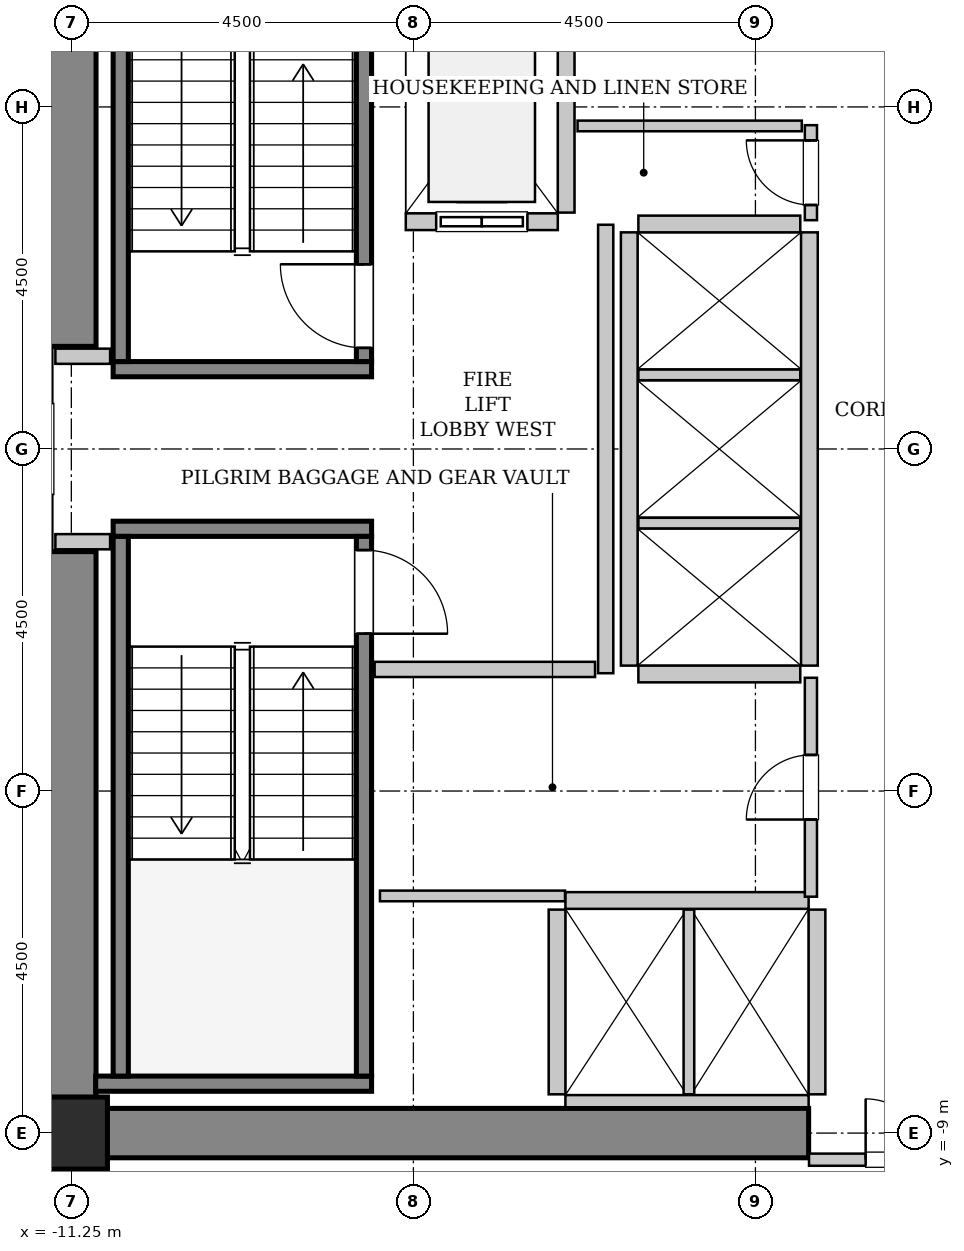
"""IFC4 building model, lengths in metres.
Left out: names, types, materials, properties, quantities, classifications, styles, units other than length and angle.
Written with IfcOpenShell. Run it as: python <this file> out.ifc"""

import sys

from ifc_helpers import new_model, si_unit, direction, frame, frame_2d, origin, origin_2d, place, context, subcontext, project, spatial, rectangle, hollow_rectangle, extrude, source, transform, mapped, element, fill, save


model = new_model("IFC4")
c1 = context("Model", 3, precision=1e-05, world=origin(), true_north=direction((0.0, 1.0)))
c2 = subcontext(c1, "Body", "Model", "MODEL_VIEW")
j1 = project(units=[si_unit("LENGTHUNIT", "METRE"), si_unit("PLANEANGLEUNIT", "RADIAN")], contexts=[c1])
p1 = place(None, origin())
s1 = spatial("IfcSite", under=j1, at=p1, CompositionType="ELEMENT")
p2 = place(p1, origin())
s2 = spatial("IfcBuilding", under=s1, at=p2, CompositionType="ELEMENT")
p3 = place(p2, frame((0.0, 0.0, 78.6)))
s3 = spatial("IfcBuildingStorey", under=s2, at=p3, CompositionType="ELEMENT", Elevation=78.6)
m1 = source(origin(), c2, "Body", "SweptSolid", [
    extrude(rectangle(XDim=10.025, YDim=0.65, at=frame_2d((5.012, 0.0))), origin(), (0.0, 0.0, 1.0), 3.8),
])
p4 = place(p3, frame((-11.575, -9.0, 0.0), z_axis=(0.0, 0.0, 1.0), x_axis=(1.0, 0.0, 0.0)))
e1 = element("IfcWall", 1, at=p4, inside=s3, PredefinedType="SHEAR", context=c2, shape_type="MappedRepresentation", body=[
    mapped(m1, transform((0.0, 0.0, 0.0), x_axis=(1.0, 0.0, 0.0), y_axis=(0.0, 1.0, 0.0), z_axis=(0.0, 0.0, 1.0), scale=1.0)),
])
m2 = source(origin(), c2, "Body", "SweptSolid", [
    extrude(rectangle(XDim=7.325, YDim=0.65, at=frame_2d((3.663, 0.0))), origin(), (0.0, 0.0, 1.0), 3.8),
])
for number, where, z_axis, x_axis in (
    (2, (-11.25, -8.675, 0.0), (0.0, 0.0, 1.0), (0.0, 1.0, 0.0)),
    (3, (-11.25, 1.35, 0.0), (0.0, 0.0, 1.0), (0.0, 1.0, 0.0)),
):
    element("IfcWall", number, at=place(p3, frame(where, z_axis=z_axis, x_axis=x_axis)), inside=s3, PredefinedType="SHEAR", context=c2, shape_type="MappedRepresentation", body=[
        mapped(m2, transform((0.0, 0.0, 0.0), x_axis=(1.0, 0.0, 0.0), y_axis=(0.0, 1.0, 0.0), z_axis=(0.0, 0.0, 1.0), scale=1.0)),
    ])
m3 = source(origin(), c2, "Body", "SweptSolid", [
    extrude(hollow_rectangle(XDim=0.95, YDim=0.95, WallThickness=0.045, InnerFilletRadius=0.045, OuterFilletRadius=0.09, at=origin_2d()), origin(), (0.0, 0.0, 1.0), 3.8),
])
p5 = place(p3, frame((-11.25, -9.0, 0.0), z_axis=(0.0, 0.0, 1.0), x_axis=(1.0, 0.0, 0.0)))
e4 = element("IfcColumn", 4, at=p5, inside=s3, PredefinedType="COLUMN", context=c2, shape_type="MappedRepresentation", body=[
    mapped(m3, transform((0.0, 0.0, 0.0), x_axis=(1.0, 0.0, 0.0), y_axis=(0.0, 1.0, 0.0), z_axis=(0.0, 0.0, 1.0), scale=1.0)),
])
m4 = source(origin(), c2, "Body", "SweptSolid", [
    extrude(rectangle(XDim=3.4, YDim=0.2, at=frame_2d((1.7, 0.0))), origin(), (0.0, 0.0, 1.0), 3.8),
])
p6 = place(p3, frame((-7.3, 1.05, 0.0), z_axis=(0.0, 0.0, 1.0), x_axis=(-1.0, 0.0, 0.0)))
e5 = element("IfcWall", 5, at=p6, inside=s3, PredefinedType="SOLIDWALL", context=c2, shape_type="MappedRepresentation", body=[
    mapped(m4, transform((0.0, 0.0, 0.0), x_axis=(1.0, 0.0, 0.0), y_axis=(0.0, 1.0, 0.0), z_axis=(0.0, 0.0, 1.0), scale=1.0)),
])
m5 = source(origin(), c2, "Body", "SweptSolid", [
    extrude(rectangle(XDim=7.1, YDim=0.2, at=frame_2d((3.55, 0.0))), origin(), (0.0, 0.0, 1.0), 3.8),
])
p7 = place(p3, frame((-7.4, 1.15, 0.0), z_axis=(0.0, 0.0, 1.0), x_axis=(0.0, 1.0, 0.0)))
e6 = element("IfcWall", 6, at=p7, inside=s3, PredefinedType="SOLIDWALL", context=c2, shape_type="MappedRepresentation", body=[
    mapped(m5, transform((0.0, 0.0, 0.0), x_axis=(1.0, 0.0, 0.0), y_axis=(0.0, 1.0, 0.0), z_axis=(0.0, 0.0, 1.0), scale=1.0)),
])
p8 = place(p7, frame((0.18, 0.0, 0.0)))
e7 = element("IfcOpeningElement", 7, at=p8, cuts=e6, PredefinedType="OPENING", context=c2, shape_type="SweptSolid", body=[
    extrude(rectangle(XDim=1.1, YDim=2.15, at=frame_2d((0.55, 1.075))), frame((0.0, 0.11, 0.0), z_axis=(0.0, -1.0, 0.0), x_axis=(1.0, 0.0, 0.0)), (0.0, 0.0, 1.0), 0.22),
])
p9 = place(p3, frame((-10.6, 1.15, 0.0), z_axis=(0.0, 0.0, 1.0), x_axis=(0.0, 1.0, 0.0)))
e8 = element("IfcWall", 8, at=p9, inside=s3, PredefinedType="SOLIDWALL", context=c2, shape_type="MappedRepresentation", body=[
    mapped(m5, transform((0.0, 0.0, 0.0), x_axis=(1.0, 0.0, 0.0), y_axis=(0.0, 1.0, 0.0), z_axis=(0.0, 0.0, 1.0), scale=1.0)),
])
p10 = place(p3, frame((-10.7, -1.05, 0.0), z_axis=(0.0, 0.0, 1.0), x_axis=(1.0, 0.0, 0.0)))
e9 = element("IfcWall", 9, at=p10, inside=s3, PredefinedType="SOLIDWALL", context=c2, shape_type="MappedRepresentation", body=[
    mapped(m4, transform((0.0, 0.0, 0.0), x_axis=(1.0, 0.0, 0.0), y_axis=(0.0, 1.0, 0.0), z_axis=(0.0, 0.0, 1.0), scale=1.0)),
])
m6 = source(origin(), c2, "Body", "SweptSolid", [
    extrude(rectangle(XDim=3.63, YDim=0.2, at=frame_2d((1.815, 0.0))), origin(), (0.0, 0.0, 1.0), 3.8),
])
p11 = place(p3, frame((-10.93, -8.35, 0.0), z_axis=(0.0, 0.0, 1.0), x_axis=(1.0, 0.0, 0.0)))
e10 = element("IfcWall", 10, at=p11, inside=s3, PredefinedType="SOLIDWALL", context=c2, shape_type="MappedRepresentation", body=[
    mapped(m6, transform((0.0, 0.0, 0.0), x_axis=(1.0, 0.0, 0.0), y_axis=(0.0, 1.0, 0.0), z_axis=(0.0, 0.0, 1.0), scale=1.0)),
])
p12 = place(p3, frame((-10.6, -1.15, 0.0), z_axis=(0.0, 0.0, 1.0), x_axis=(0.0, -1.0, 0.0)))
e11 = element("IfcWall", 11, at=p12, inside=s3, PredefinedType="SOLIDWALL", context=c2, shape_type="MappedRepresentation", body=[
    mapped(m5, transform((0.0, 0.0, 0.0), x_axis=(1.0, 0.0, 0.0), y_axis=(0.0, 1.0, 0.0), z_axis=(0.0, 0.0, 1.0), scale=1.0)),
])
p13 = place(p3, frame((-7.4, -1.15, 0.0), z_axis=(0.0, 0.0, 1.0), x_axis=(0.0, -1.0, 0.0)))
e12 = element("IfcWall", 12, at=p13, inside=s3, PredefinedType="SOLIDWALL", context=c2, shape_type="MappedRepresentation", body=[
    mapped(m5, transform((0.0, 0.0, 0.0), x_axis=(1.0, 0.0, 0.0), y_axis=(0.0, 1.0, 0.0), z_axis=(0.0, 0.0, 1.0), scale=1.0)),
])
p14 = place(p13, frame((0.18, 0.0, 0.0)))
e13 = element("IfcOpeningElement", 13, at=p14, cuts=e12, PredefinedType="OPENING", context=c2, shape_type="SweptSolid", body=[
    extrude(rectangle(XDim=1.1, YDim=2.15, at=frame_2d((0.55, 1.075))), frame((0.0, 0.11, 0.0), z_axis=(0.0, -1.0, 0.0), x_axis=(1.0, 0.0, 0.0)), (0.0, 0.0, 1.0), 0.22),
])
m7 = source(origin(), c2, "Body", "SweptSolid", [
    extrude(rectangle(XDim=2.0, YDim=0.22, at=frame_2d((1.0, 0.0))), origin(), (0.0, 0.0, 1.0), 3.535),
])
p15 = place(p3, frame((-6.85, 2.99, 0.0), z_axis=(0.0, 0.0, 1.0), x_axis=(1.0, 0.0, 0.0)))
e14 = element("IfcWall", 14, at=p15, inside=s3, PredefinedType="SOLIDWALL", context=c2, shape_type="MappedRepresentation", body=[
    mapped(m7, transform((0.0, 0.0, 0.0), x_axis=(1.0, 0.0, 0.0), y_axis=(0.0, 1.0, 0.0), z_axis=(0.0, 0.0, 1.0), scale=1.0)),
])
p16 = place(p15, frame((0.4, 0.0, 0.0)))
e15 = element("IfcOpeningElement", 15, at=p16, cuts=e14, PredefinedType="OPENING", context=c2, shape_type="SweptSolid", body=[
    extrude(rectangle(XDim=1.2, YDim=2.2, at=frame_2d((0.6, 1.1))), frame((0.0, 0.12, 0.0), z_axis=(0.0, -1.0, 0.0), x_axis=(1.0, 0.0, 0.0)), (0.0, 0.0, 1.0), 0.24),
])
m8 = source(origin(), c2, "Body", "SweptSolid", [
    extrude(rectangle(XDim=2.68, YDim=0.22, at=frame_2d((1.34, 0.0))), origin(), (0.0, 0.0, 1.0), 3.535),
])
p17 = place(p3, frame((-4.74, 3.11, 0.0), z_axis=(0.0, 0.0, 1.0), x_axis=(0.0, 1.0, 0.0)))
e16 = element("IfcWall", 16, at=p17, inside=s3, PredefinedType="SOLIDWALL", context=c2, shape_type="MappedRepresentation", body=[
    mapped(m8, transform((0.0, 0.0, 0.0), x_axis=(1.0, 0.0, 0.0), y_axis=(0.0, 1.0, 0.0), z_axis=(0.0, 0.0, 1.0), scale=1.0)),
])
m9 = source(origin(), c2, "Body", "SweptSolid", [
    extrude(rectangle(XDim=3.2, YDim=0.22, at=frame_2d((1.6, 0.0))), origin(), (0.0, 0.0, 1.0), 3.535),
])
p18 = place(p3, frame((-1.55, -5.94, 0.0), z_axis=(0.0, 0.0, 1.0), x_axis=(-1.0, 0.0, 0.0)))
e17 = element("IfcWall", 17, at=p18, inside=s3, PredefinedType="SOLIDWALL", context=c2, shape_type="MappedRepresentation", body=[
    mapped(m9, transform((0.0, 0.0, 0.0), x_axis=(1.0, 0.0, 0.0), y_axis=(0.0, 1.0, 0.0), z_axis=(0.0, 0.0, 1.0), scale=1.0)),
])
m10 = source(origin(), c2, "Body", "SweptSolid", [
    extrude(rectangle(XDim=3.2, YDim=0.16, at=frame_2d((1.6, 0.0))), origin(), (0.0, 0.0, 1.0), 2.425),
])
p19 = place(p3, frame((-4.75, -8.58, 0.0), z_axis=(0.0, 0.0, 1.0), x_axis=(1.0, 0.0, 0.0)))
e18 = element("IfcWall", 18, at=p19, inside=s3, PredefinedType="PARTITIONING", context=c2, shape_type="MappedRepresentation", body=[
    mapped(m10, transform((0.0, 0.0, 0.0), x_axis=(1.0, 0.0, 0.0), y_axis=(0.0, 1.0, 0.0), z_axis=(0.0, 0.0, 1.0), scale=1.0)),
])
m11 = source(origin(), c2, "Body", "SweptSolid", [
    extrude(rectangle(XDim=2.43, YDim=0.22, at=frame_2d((1.215, 0.0))), origin(), (0.0, 0.0, 1.0), 3.535),
])
p20 = place(p3, frame((-4.86, -6.06, 0.0), z_axis=(0.0, 0.0, 1.0), x_axis=(0.0, -1.0, 0.0)))
e19 = element("IfcWall", 19, at=p20, inside=s3, PredefinedType="SOLIDWALL", context=c2, shape_type="MappedRepresentation", body=[
    mapped(m11, transform((0.0, 0.0, 0.0), x_axis=(1.0, 0.0, 0.0), y_axis=(0.0, 1.0, 0.0), z_axis=(0.0, 0.0, 1.0), scale=1.0)),
])
m12 = source(origin(), c2, "Body", "SweptSolid", [
    extrude(rectangle(XDim=2.43, YDim=0.14, at=frame_2d((1.215, 0.0))), origin(), (0.0, 0.0, 1.0), 3.535),
])
p21 = place(p3, frame((-3.125, -8.49, 0.0), z_axis=(0.0, 0.0, 1.0), x_axis=(0.0, 1.0, 0.0)))
e20 = element("IfcWall", 20, at=p21, inside=s3, PredefinedType="PARTITIONING", context=c2, shape_type="MappedRepresentation", body=[
    mapped(m12, transform((0.0, 0.0, 0.0), x_axis=(1.0, 0.0, 0.0), y_axis=(0.0, 1.0, 0.0), z_axis=(0.0, 0.0, 1.0), scale=1.0)),
])
p22 = place(p3, frame((-1.44, -8.49, 0.0), z_axis=(0.0, 0.0, 1.0), x_axis=(0.0, 1.0, 0.0)))
e21 = element("IfcWall", 21, at=p22, inside=s3, PredefinedType="SOLIDWALL", context=c2, shape_type="MappedRepresentation", body=[
    mapped(m11, transform((0.0, 0.0, 0.0), x_axis=(1.0, 0.0, 0.0), y_axis=(0.0, 1.0, 0.0), z_axis=(0.0, 0.0, 1.0), scale=1.0)),
])
m13 = source(origin(), c2, "Body", "SweptSolid", [
    extrude(rectangle(XDim=5.7, YDim=0.22, at=frame_2d((2.85, 0.0))), origin(), (0.0, 0.0, 1.0), 3.535),
])
for number, where, z_axis, x_axis in (
    (22, (-1.54, -2.85, 0.0), (0.0, 0.0, 1.0), (0.0, 1.0, 0.0)),
    (23, (-3.91, 2.85, 0.0), (0.0, 0.0, 1.0), (0.0, -1.0, 0.0)),
):
    element("IfcWall", number, at=place(p3, frame(where, z_axis=z_axis, x_axis=x_axis)), inside=s3, PredefinedType="SOLIDWALL", context=c2, shape_type="MappedRepresentation", body=[
        mapped(m13, transform((0.0, 0.0, 0.0), x_axis=(1.0, 0.0, 0.0), y_axis=(0.0, 1.0, 0.0), z_axis=(0.0, 0.0, 1.0), scale=1.0)),
    ])
m14 = source(origin(), c2, "Body", "SweptSolid", [
    extrude(rectangle(XDim=2.13, YDim=0.22, at=frame_2d((1.065, 0.0))), origin(), (0.0, 0.0, 1.0), 3.535),
])
p23 = place(p3, frame((-3.79, -2.96, 0.0), z_axis=(0.0, 0.0, 1.0), x_axis=(1.0, 0.0, 0.0)))
e24 = element("IfcWall", 24, at=p23, inside=s3, PredefinedType="SOLIDWALL", context=c2, shape_type="MappedRepresentation", body=[
    mapped(m14, transform((0.0, 0.0, 0.0), x_axis=(1.0, 0.0, 0.0), y_axis=(0.0, 1.0, 0.0), z_axis=(0.0, 0.0, 1.0), scale=1.0)),
])
m15 = source(origin(), c2, "Body", "SweptSolid", [
    extrude(rectangle(XDim=2.13, YDim=0.14, at=frame_2d((1.065, 0.0))), origin(), (0.0, 0.0, 1.0), 3.535),
])
for number, where, z_axis, x_axis in (
    (25, (-3.79, -0.975, 0.0), (0.0, 0.0, 1.0), (1.0, 0.0, 0.0)),
    (26, (-3.79, 0.975, 0.0), (0.0, 0.0, 1.0), (1.0, 0.0, 0.0)),
):
    element("IfcWall", number, at=place(p3, frame(where, z_axis=z_axis, x_axis=x_axis)), inside=s3, PredefinedType="PARTITIONING", context=c2, shape_type="MappedRepresentation", body=[
        mapped(m15, transform((0.0, 0.0, 0.0), x_axis=(1.0, 0.0, 0.0), y_axis=(0.0, 1.0, 0.0), z_axis=(0.0, 0.0, 1.0), scale=1.0)),
    ])
p24 = place(p3, frame((-1.66, 2.96, 0.0), z_axis=(0.0, 0.0, 1.0), x_axis=(-1.0, 0.0, 0.0)))
e27 = element("IfcWall", 27, at=p24, inside=s3, PredefinedType="SOLIDWALL", context=c2, shape_type="MappedRepresentation", body=[
    mapped(m14, transform((0.0, 0.0, 0.0), x_axis=(1.0, 0.0, 0.0), y_axis=(0.0, 1.0, 0.0), z_axis=(0.0, 0.0, 1.0), scale=1.0)),
])
m16 = source(origin(), c2, "Body", "SweptSolid", [
    extrude(rectangle(XDim=5.9, YDim=0.2, at=frame_2d((2.95, 0.0))), origin(), (0.0, 0.0, 1.0), 3.535),
])
p25 = place(p3, frame((-4.22, -2.95, 0.0), z_axis=(0.0, 0.0, 1.0), x_axis=(0.0, 1.0, 0.0)))
e28 = element("IfcWall", 28, at=p25, inside=s3, PredefinedType="PARTITIONING", context=c2, shape_type="MappedRepresentation", body=[
    mapped(m16, transform((0.0, 0.0, 0.0), x_axis=(1.0, 0.0, 0.0), y_axis=(0.0, 1.0, 0.0), z_axis=(0.0, 0.0, 1.0), scale=1.0)),
])
m17 = source(origin(), c2, "Body", "SweptSolid", [
    extrude(rectangle(XDim=2.9, YDim=0.2, at=frame_2d((1.45, 0.0))), origin(), (0.0, 0.0, 1.0), 3.535),
])
p26 = place(p3, frame((-7.26, -2.9, 0.0), z_axis=(0.0, 0.0, 1.0), x_axis=(1.0, 0.0, 0.0)))
e29 = element("IfcWall", 29, at=p26, inside=s3, PredefinedType="PARTITIONING", context=c2, shape_type="MappedRepresentation", body=[
    mapped(m17, transform((0.0, 0.0, 0.0), x_axis=(1.0, 0.0, 0.0), y_axis=(0.0, 1.0, 0.0), z_axis=(0.0, 0.0, 1.0), scale=1.0)),
])
m18 = source(origin(), c2, "Body", "SweptSolid", [
    extrude(rectangle(XDim=0.72, YDim=0.2, at=frame_2d((0.36, 0.0))), origin(), (0.0, 0.0, 1.0), 3.535),
])
for number, where, z_axis, x_axis in (
    (30, (-11.46, 1.22, 0.0), (0.0, 0.0, 1.0), (1.0, 0.0, 0.0)),
    (31, (-11.46, -1.22, 0.0), (0.0, 0.0, 1.0), (1.0, 0.0, 0.0)),
):
    element("IfcWall", number, at=place(p3, frame(where, z_axis=z_axis, x_axis=x_axis)), inside=s3, PredefinedType="PARTITIONING", context=c2, shape_type="MappedRepresentation", body=[
        mapped(m18, transform((0.0, 0.0, 0.0), x_axis=(1.0, 0.0, 0.0), y_axis=(0.0, 1.0, 0.0), z_axis=(0.0, 0.0, 1.0), scale=1.0)),
    ])
m19 = source(origin(), c2, "Body", "SweptSolid", [
    extrude(rectangle(XDim=3.09, YDim=0.16, at=frame_2d((1.545, 0.0))), origin(), (0.0, 0.0, 1.0), 2.425),
])
p27 = place(p3, frame((-1.545, -9.35, 0.0), z_axis=(0.0, 0.0, 1.0), x_axis=(1.0, 0.0, 0.0)))
e32 = element("IfcWall", 32, at=p27, inside=s3, PredefinedType="PARTITIONING", context=c2, shape_type="MappedRepresentation", body=[
    mapped(m19, transform((0.0, 0.0, 0.0), x_axis=(1.0, 0.0, 0.0), y_axis=(0.0, 1.0, 0.0), z_axis=(0.0, 0.0, 1.0), scale=1.0)),
])
p28 = place(p27, frame((0.745, 0.0, 0.0)))
e33 = element("IfcOpeningElement", 33, at=p28, cuts=e32, PredefinedType="OPENING", context=c2, shape_type="SweptSolid", body=[
    extrude(rectangle(XDim=1.6, YDim=2.3, at=frame_2d((0.8, 1.15))), frame((0.0, 0.09, 0.0), z_axis=(0.0, -1.0, 0.0), x_axis=(1.0, 0.0, 0.0)), (0.0, 0.0, 1.0), 0.18),
])
m20 = source(origin(), c2, "Body", "SweptSolid", [
    extrude(rectangle(XDim=1.25, YDim=0.16, at=frame_2d((0.625, 0.0))), origin(), (0.0, 0.0, 1.0), 3.535),
])
p29 = place(p3, frame((-1.52, 3.01, 0.0), z_axis=(0.0, 0.0, 1.0), x_axis=(0.0, 1.0, 0.0)))
e34 = element("IfcWall", 34, at=p29, inside=s3, PredefinedType="PARTITIONING", context=c2, shape_type="MappedRepresentation", body=[
    mapped(m20, transform((0.0, 0.0, 0.0), x_axis=(1.0, 0.0, 0.0), y_axis=(0.0, 1.0, 0.0), z_axis=(0.0, 0.0, 1.0), scale=1.0)),
])
p30 = place(p29, frame((0.2, 0.0, 0.0)))
e35 = element("IfcOpeningElement", 35, at=p30, cuts=e34, PredefinedType="OPENING", context=c2, shape_type="SweptSolid", body=[
    extrude(rectangle(XDim=0.85, YDim=2.1, at=frame_2d((0.425, 1.05))), frame((0.0, 0.09, 0.0), z_axis=(0.0, -1.0, 0.0), x_axis=(1.0, 0.0, 0.0)), (0.0, 0.0, 1.0), 0.18),
])
m21 = source(origin(), c2, "Body", "SweptSolid", [
    extrude(rectangle(XDim=2.95, YDim=0.14, at=frame_2d((1.475, 0.0))), origin(), (0.0, 0.0, 1.0), 3.535),
])
p31 = place(p3, frame((-4.59, 4.25, 0.0), z_axis=(0.0, 0.0, 1.0), x_axis=(1.0, 0.0, 0.0)))
e36 = element("IfcWall", 36, at=p31, inside=s3, PredefinedType="PARTITIONING", context=c2, shape_type="MappedRepresentation", body=[
    mapped(m21, transform((0.0, 0.0, 0.0), x_axis=(1.0, 0.0, 0.0), y_axis=(0.0, 1.0, 0.0), z_axis=(0.0, 0.0, 1.0), scale=1.0)),
])
m22 = source(origin(), c2, "Body", "SweptSolid", [
    extrude(rectangle(XDim=2.88, YDim=0.16, at=frame_2d((1.44, 0.0))), origin(), (0.0, 0.0, 1.0), 3.535),
])
p32 = place(p3, frame((-1.52, -5.89, 0.0), z_axis=(0.0, 0.0, 1.0), x_axis=(0.0, 1.0, 0.0)))
e37 = element("IfcWall", 37, at=p32, inside=s3, PredefinedType="PARTITIONING", context=c2, shape_type="MappedRepresentation", body=[
    mapped(m22, transform((0.0, 0.0, 0.0), x_axis=(1.0, 0.0, 0.0), y_axis=(0.0, 1.0, 0.0), z_axis=(0.0, 0.0, 1.0), scale=1.0)),
])
p33 = place(p32, frame((1.015, 0.0, 0.0)))
e38 = element("IfcOpeningElement", 38, at=p33, cuts=e37, PredefinedType="OPENING", context=c2, shape_type="SweptSolid", body=[
    extrude(rectangle(XDim=0.85, YDim=2.1, at=frame_2d((0.425, 1.05))), frame((0.0, 0.09, 0.0), z_axis=(0.0, -1.0, 0.0), x_axis=(1.0, 0.0, 0.0)), (0.0, 0.0, 1.0), 0.18),
])
m23 = source(origin(), c2, "Body", "SweptSolid", [
    extrude(rectangle(XDim=2.435, YDim=0.14, at=frame_2d((1.218, 0.0))), origin(), (0.0, 0.0, 1.0), 3.535),
])
p34 = place(p3, frame((-7.19, -5.88, 0.0), z_axis=(0.0, 0.0, 1.0), x_axis=(1.0, 0.0, 0.0)))
e39 = element("IfcWall", 39, at=p34, inside=s3, PredefinedType="PARTITIONING", context=c2, shape_type="MappedRepresentation", body=[
    mapped(m23, transform((0.0, 0.0, 0.0), x_axis=(1.0, 0.0, 0.0), y_axis=(0.0, 1.0, 0.0), z_axis=(0.0, 0.0, 1.0), scale=1.0)),
])
m24 = source(origin(), c2, "Body", "SweptSolid", [
    extrude(rectangle(XDim=1.1, YDim=2.15, at=frame_2d((0.55, 1.075))), frame((0.0, 0.025, 0.0), z_axis=(0.0, -1.0, 0.0), x_axis=(1.0, 0.0, 0.0)), (0.0, 0.0, 1.0), 0.05),
])
p35 = place(p8, origin())
e40 = element("IfcDoor", 40, at=p35, inside=s3, OperationType="SINGLE_SWING_RIGHT", PredefinedType="DOOR", context=c2, shape_type="MappedRepresentation", body=[
    mapped(m24, transform((0.0, 0.0, 0.0), x_axis=(1.0, 0.0, 0.0), y_axis=(0.0, 1.0, 0.0), z_axis=(0.0, 0.0, 1.0), scale=1.0)),
])
fill(e7, e40)
p36 = place(p14, origin())
e41 = element("IfcDoor", 41, at=p36, inside=s3, OperationType="SINGLE_SWING_RIGHT", PredefinedType="DOOR", context=c2, shape_type="MappedRepresentation", body=[
    mapped(m24, transform((0.0, 0.0, 0.0), x_axis=(1.0, 0.0, 0.0), y_axis=(0.0, 1.0, 0.0), z_axis=(0.0, 0.0, 1.0), scale=1.0)),
])
fill(e13, e41)
m25 = source(origin(), c2, "Body", "SweptSolid", [
    extrude(rectangle(XDim=1.2, YDim=2.2, at=frame_2d((0.6, 1.1))), frame((0.0, 0.025, 0.0), z_axis=(0.0, -1.0, 0.0), x_axis=(1.0, 0.0, 0.0)), (0.0, 0.0, 1.0), 0.05),
])
p37 = place(p16, origin())
e42 = element("IfcDoor", 42, at=p37, inside=s3, OperationType="SLIDING_TO_LEFT", PredefinedType="DOOR", context=c2, shape_type="MappedRepresentation", body=[
    mapped(m25, transform((0.0, 0.0, 0.0), x_axis=(1.0, 0.0, 0.0), y_axis=(0.0, 1.0, 0.0), z_axis=(0.0, 0.0, 1.0), scale=1.0)),
])
fill(e15, e42)
m26 = source(origin(), c2, "Body", "SweptSolid", [
    extrude(rectangle(XDim=1.6, YDim=2.3, at=frame_2d((0.8, 1.15))), frame((0.0, 0.025, 0.0), z_axis=(0.0, -1.0, 0.0), x_axis=(1.0, 0.0, 0.0)), (0.0, 0.0, 1.0), 0.05),
])
p38 = place(p28, origin())
e43 = element("IfcDoor", 43, at=p38, inside=s3, OperationType="DOUBLE_DOOR_SINGLE_SWING", PredefinedType="DOOR", context=c2, shape_type="MappedRepresentation", body=[
    mapped(m26, transform((0.0, 0.0, 0.0), x_axis=(1.0, 0.0, 0.0), y_axis=(0.0, 1.0, 0.0), z_axis=(0.0, 0.0, 1.0), scale=1.0)),
])
fill(e33, e43)
m27 = source(origin(), c2, "Body", "SweptSolid", [
    extrude(rectangle(XDim=0.85, YDim=2.1, at=frame_2d((0.425, 1.05))), frame((0.0, 0.025, 0.0), z_axis=(0.0, -1.0, 0.0), x_axis=(1.0, 0.0, 0.0)), (0.0, 0.0, 1.0), 0.05),
])
p39 = place(p30, origin())
e44 = element("IfcDoor", 44, at=p39, inside=s3, OperationType="SINGLE_SWING_RIGHT", PredefinedType="DOOR", context=c2, shape_type="MappedRepresentation", body=[
    mapped(m27, transform((0.0, 0.0, 0.0), x_axis=(1.0, 0.0, 0.0), y_axis=(0.0, 1.0, 0.0), z_axis=(0.0, 0.0, 1.0), scale=1.0)),
])
fill(e35, e44)
p40 = place(p33, origin())
e45 = element("IfcDoor", 45, at=p40, inside=s3, OperationType="SINGLE_SWING_LEFT", PredefinedType="DOOR", context=c2, shape_type="MappedRepresentation", body=[
    mapped(m27, transform((0.0, 0.0, 0.0), x_axis=(1.0, 0.0, 0.0), y_axis=(0.0, 1.0, 0.0), z_axis=(0.0, 0.0, 1.0), scale=1.0)),
])
fill(e38, e45)
save(model, sys.argv[1])
